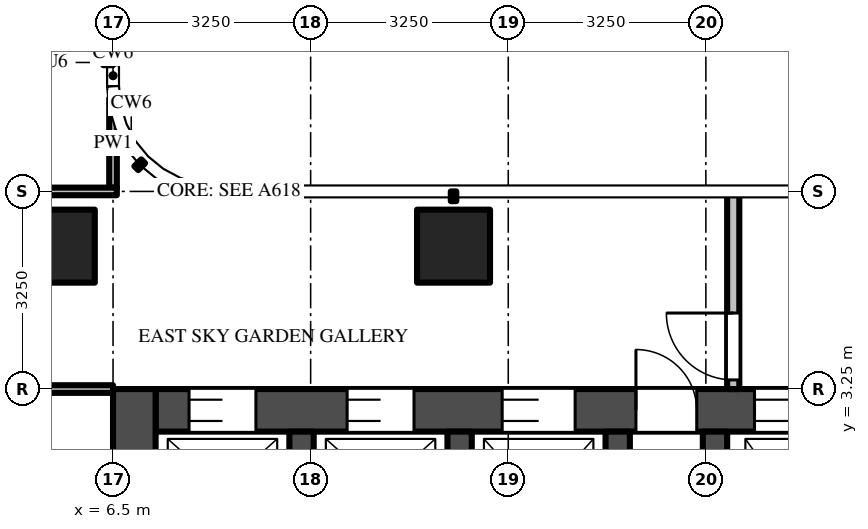
"""IFC4 building model, lengths in metres.
Left out: names, types, materials, properties, quantities, classifications, styles, units other than length and angle.
Written with IfcOpenShell. Run it as: python <this file> out.ifc"""

import sys

from ifc_helpers import new_model, si_unit, direction, frame, frame_2d, origin, origin_2d, place, context, subcontext, project, spatial, rectangle, extrude, source, transform, mapped, element, fill, save


model = new_model("IFC4")
c1 = context("Model", 3, precision=1e-05, world=origin(), true_north=direction((0.0, 1.0)))
c2 = subcontext(c1, "Body", "Model", "MODEL_VIEW")
j1 = project(units=[si_unit("LENGTHUNIT", "METRE"), si_unit("PLANEANGLEUNIT", "RADIAN")], contexts=[c1])
p1 = place(None, origin())
s1 = spatial("IfcSite", under=j1, at=p1, CompositionType="ELEMENT")
p2 = place(p1, origin())
s2 = spatial("IfcBuilding", under=s1, at=p2, CompositionType="ELEMENT")
p3 = place(p2, frame((0.0, 0.0, 156.0)))
s3 = spatial("IfcBuildingStorey", under=s2, at=p3, CompositionType="ELEMENT", Elevation=156.0)
m1 = source(origin(), c2, "Body", "SweptSolid", [
    extrude(rectangle(XDim=1.2, YDim=1.2, at=origin_2d()), origin(), (0.0, 0.0, 1.0), 6.0),
])
for number, where, z_axis, x_axis in (
    (1, (12.1, 5.6, 0.0), (0.0, 0.0, 1.0), (1.0, 0.0, 0.0)),
    (2, (5.6, 5.6, 0.0), (0.0, 0.0, 1.0), (1.0, 0.0, 0.0)),
):
    element("IfcColumn", number, at=place(p3, frame(where, z_axis=z_axis, x_axis=x_axis)), inside=s3, PredefinedType="COLUMN", context=c2, shape_type="MappedRepresentation", body=[
        mapped(m1, transform((0.0, 0.0, 0.0))),
    ])
m2 = source(origin(), c2, "Body", "SweptSolid", [
    extrude(rectangle(XDim=14.85, YDim=0.7, at=frame_2d((7.425, 0.0))), origin(), (0.0, 0.0, 1.0), 5.8),
])
p4 = place(p3, frame((7.2, 2.9, 0.0), z_axis=(0.0, 0.0, 1.0), x_axis=(1.0, 0.0, 0.0)))
e3 = element("IfcWall", 3, at=p4, inside=s3, PredefinedType="SHEAR", context=c2, shape_type="MappedRepresentation", body=[
    mapped(m2, transform((0.0, 0.0, 0.0))),
])
m3 = source(origin(), c2, "Body", "SweptSolid", [
    extrude(rectangle(XDim=1.1, YDim=2.1, at=frame_2d((0.55, 1.05))), frame((0.0, 0.36, 0.0), z_axis=(0.0, -1.0, 0.0), x_axis=(1.0, 0.0, 0.0)), (0.0, 0.0, 1.0), 0.72),
])
p5 = place(p4, frame((0.55, 0.0, 0.0)))
e4 = element("IfcOpeningElement", 4, at=p5, cuts=e3, PredefinedType="OPENING", context=c2, shape_type="MappedRepresentation", body=[
    mapped(m3, transform((0.0, 0.0, 0.0))),
])
p6 = place(p4, frame((3.15, 0.0, 0.0)))
e5 = element("IfcOpeningElement", 5, at=p6, cuts=e3, PredefinedType="OPENING", context=c2, shape_type="MappedRepresentation", body=[
    mapped(m3, transform((0.0, 0.0, 0.0))),
])
m4 = source(origin(), c2, "Body", "SweptSolid", [
    extrude(rectangle(XDim=1.2, YDim=2.1, at=frame_2d((0.6, 1.05))), frame((0.0, 0.36, 0.0), z_axis=(0.0, -1.0, 0.0), x_axis=(1.0, 0.0, 0.0)), (0.0, 0.0, 1.0), 0.72),
])
p7 = place(p4, frame((5.7, 0.0, 0.0)))
e6 = element("IfcOpeningElement", 6, at=p7, cuts=e3, PredefinedType="OPENING", context=c2, shape_type="MappedRepresentation", body=[
    mapped(m4, transform((0.0, 0.0, 0.0))),
])
m5 = source(origin(), c2, "Body", "SweptSolid", [
    extrude(rectangle(XDim=1.3, YDim=2.1, at=frame_2d((0.65, 1.05))), frame((0.0, 0.36, 0.0), z_axis=(0.0, -1.0, 0.0), x_axis=(1.0, 0.0, 0.0)), (0.0, 0.0, 1.0), 0.72),
])
p8 = place(p4, frame((12.2, 0.0, 0.0)))
e7 = element("IfcOpeningElement", 7, at=p8, cuts=e3, PredefinedType="OPENING", context=c2, shape_type="MappedRepresentation", body=[
    mapped(m5, transform((0.0, 0.0, 0.0))),
])
p9 = place(p4, frame((9.85, 0.0, 0.0)))
e8 = element("IfcOpeningElement", 8, at=p9, cuts=e3, PredefinedType="OPENING", context=c2, shape_type="MappedRepresentation", body=[
    mapped(m4, transform((0.0, 0.0, 0.0))),
])
m6 = source(origin(), c2, "Body", "SweptSolid", [
    extrude(rectangle(XDim=1.0, YDim=2.1, at=frame_2d((0.5, 1.05))), frame((0.0, 0.36, 0.0), z_axis=(0.0, -1.0, 0.0), x_axis=(1.0, 0.0, 0.0)), (0.0, 0.0, 1.0), 0.72),
])
p10 = place(p4, frame((7.9, 0.0, 0.0)))
e9 = element("IfcOpeningElement", 9, at=p10, cuts=e3, PredefinedType="OPENING", context=c2, shape_type="MappedRepresentation", body=[
    mapped(m6, transform((0.0, 0.0, 0.0))),
])
m7 = source(origin(), c2, "Body", "SweptSolid", [
    extrude(rectangle(XDim=9.05, YDim=0.7, at=frame_2d((4.525, 0.0))), origin(), (0.0, 0.0, 1.0), 5.8),
])
p11 = place(p3, frame((6.85, -5.8, 0.0), z_axis=(0.0, 0.0, 1.0), x_axis=(0.0, 1.0, 0.0)))
e10 = element("IfcWall", 10, at=p11, inside=s3, PredefinedType="SHEAR", context=c2, shape_type="MappedRepresentation", body=[
    mapped(m7, transform((0.0, 0.0, 0.0))),
])
m8 = source(origin(), c2, "Body", "SweptSolid", [
    extrude(rectangle(XDim=1.8, YDim=2.1, at=frame_2d((0.9, 1.05))), frame((0.0, 0.36, 0.0), z_axis=(0.0, -1.0, 0.0), x_axis=(1.0, 0.0, 0.0)), (0.0, 0.0, 1.0), 0.72),
])
p12 = place(p11, frame((3.15, 0.0, 0.0)))
e11 = element("IfcOpeningElement", 11, at=p12, cuts=e10, PredefinedType="OPENING", context=c2, shape_type="MappedRepresentation", body=[
    mapped(m8, transform((0.0, 0.0, 0.0))),
])
m9 = source(origin(), c2, "Body", "SweptSolid", [
    extrude(rectangle(XDim=2.45, YDim=0.4, at=frame_2d((1.225, 0.0))), origin(), (0.0, 0.0, 1.0), 5.8),
])
for number, where, z_axis, x_axis in (
    (12, (9.6, 0.1, 0.0), (0.0, 0.0, 1.0), (0.0, 1.0, 0.0)),
    (13, (12.2, 0.1, 0.0), (0.0, 0.0, 1.0), (0.0, 1.0, 0.0)),
    (14, (14.8, 0.1, 0.0), (0.0, 0.0, 1.0), (0.0, 1.0, 0.0)),
    (15, (16.4, 0.1, 0.0), (0.0, 0.0, 1.0), (0.0, 1.0, 0.0)),
):
    element("IfcWall", number, at=place(p3, frame(where, z_axis=z_axis, x_axis=x_axis)), inside=s3, PredefinedType="SHEAR", context=c2, shape_type="MappedRepresentation", body=[
        mapped(m9, transform((0.0, 0.0, 0.0))),
    ])
m10 = source(origin(), c2, "Body", "SweptSolid", [
    extrude(rectangle(XDim=3.25, YDim=0.2, at=frame_2d((1.625, 0.0))), origin(), (0.0, 0.0, 1.0), 5.8),
])
p13 = place(p3, frame((16.7, 3.25, 0.0), z_axis=(0.0, 0.0, 1.0), x_axis=(0.0, 1.0, 0.0)))
e16 = element("IfcWall", 16, at=p13, inside=s3, PredefinedType="PARTITIONING", context=c2, shape_type="MappedRepresentation", body=[
    mapped(m10, transform((0.0, 0.0, 0.0))),
])
m11 = source(origin(), c2, "Body", "SweptSolid", [
    extrude(rectangle(XDim=1.1, YDim=2.1, at=frame_2d((0.55, 1.05))), frame((0.0, 0.11, 0.0), z_axis=(0.0, -1.0, 0.0), x_axis=(1.0, 0.0, 0.0)), (0.0, 0.0, 1.0), 0.22),
])
p14 = place(p13, frame((0.15, 0.0, 0.0)))
e17 = element("IfcOpeningElement", 17, at=p14, cuts=e16, PredefinedType="OPENING", context=c2, shape_type="MappedRepresentation", body=[
    mapped(m11, transform((0.0, 0.0, 0.0))),
])
p15 = place(p3, frame((6.4, 8.666, 0.0), z_axis=(0.0, 0.0, 1.0), x_axis=(0.0, 1.0, 0.0)))
e18 = element("IfcWall", 18, at=p15, inside=s3, PredefinedType="SOLIDWALL", context=c2, shape_type="SweptSolid", body=[
    extrude(rectangle(XDim=3.0, YDim=0.2, at=frame_2d((1.5, 0.0))), origin(), (0.0, 0.0, 1.0), 5.8),
])
m12 = source(origin(), c2, "Body", "SweptSolid", [
    extrude(rectangle(XDim=1.8, YDim=2.4, at=frame_2d((0.9, 1.2))), frame((0.0, 0.11, 0.0), z_axis=(0.0, -1.0, 0.0), x_axis=(1.0, 0.0, 0.0)), (0.0, 0.0, 1.0), 0.22),
])
p16 = place(p15, frame((0.6, 0.0, 0.0)))
e19 = element("IfcOpeningElement", 19, at=p16, cuts=e18, PredefinedType="OPENING", context=c2, shape_type="MappedRepresentation", body=[
    mapped(m12, transform((0.0, 0.0, 0.0))),
])
m13 = source(origin(), c2, "Body", "SweptSolid", [
    extrude(rectangle(XDim=1.469, YDim=0.125, at=frame_2d((0.734, 0.0))), origin(), (0.0, 0.0, 1.0), 5.8),
])
p17 = place(p3, frame((6.5, 6.562, 0.0), z_axis=(0.0, 0.0, 1.0), x_axis=(0.0, 1.0, 0.0)))
e20 = element("IfcWall", 20, at=p17, inside=s3, PredefinedType="PARTITIONING", context=c2, shape_type="MappedRepresentation", body=[
    mapped(m13, transform((0.0, 0.0, 0.0))),
])
m14 = source(origin(), c2, "Body", "SweptSolid", [
    extrude(rectangle(XDim=5.363, YDim=0.125, at=frame_2d((2.681, 0.0))), origin(), (0.0, 0.0, 1.0), 5.097),
])
p18 = place(p3, frame((1.137, 3.25, 0.0), z_axis=(0.0, 0.0, 1.0), x_axis=(1.0, 0.0, 0.0)))
e21 = element("IfcWall", 21, at=p18, inside=s3, PredefinedType="PARTITIONING", context=c2, shape_type="MappedRepresentation", body=[
    mapped(m14, transform((0.0, 0.0, 0.0))),
])
p19 = place(p3, frame((-1.262, 6.5, 0.0), z_axis=(0.0, 0.0, 1.0), x_axis=(1.0, 0.0, 0.0)))
e22 = element("IfcWall", 22, at=p19, inside=s3, PredefinedType="PARTITIONING", context=c2, shape_type="SweptSolid", body=[
    extrude(rectangle(XDim=7.825, YDim=0.125, at=frame_2d((3.913, 0.0))), origin(), (0.0, 0.0, 1.0), 4.88),
])
m15 = source(origin(), c2, "Body", "SweptSolid", [
    extrude(rectangle(XDim=1.8, YDim=2.1, at=frame_2d((0.9, 1.05))), frame((0.0, 0.073, 0.0), z_axis=(0.0, -1.0, 0.0), x_axis=(1.0, 0.0, 0.0)), (0.0, 0.0, 1.0), 0.145),
])
p20 = place(p19, frame((4.413, 0.0, 0.0)))
e23 = element("IfcOpeningElement", 23, at=p20, cuts=e22, PredefinedType="OPENING", context=c2, shape_type="MappedRepresentation", body=[
    mapped(m15, transform((0.0, 0.0, 0.0))),
])
m16 = source(origin(), c2, "Body", "SweptSolid", [
    extrude(rectangle(XDim=1.1, YDim=2.1, at=frame_2d((0.55, 1.05))), frame((0.0, -0.275, 0.0), z_axis=(0.0, -1.0, 0.0), x_axis=(1.0, 0.0, 0.0)), (0.0, 0.0, 1.0), 0.05),
])
p21 = place(p5, origin())
e24 = element("IfcDoor", 24, at=p21, inside=s3, OperationType="DOUBLE_DOOR_SLIDING", PredefinedType="DOOR", context=c2, shape_type="MappedRepresentation", body=[
    mapped(m16, transform((0.0, 0.0, 0.0))),
])
fill(e4, e24)
p22 = place(p6, origin())
e25 = element("IfcDoor", 25, at=p22, inside=s3, OperationType="DOUBLE_DOOR_SLIDING", PredefinedType="DOOR", context=c2, shape_type="MappedRepresentation", body=[
    mapped(m16, transform((0.0, 0.0, 0.0))),
])
fill(e5, e25)
m17 = source(origin(), c2, "Body", "SweptSolid", [
    extrude(rectangle(XDim=1.2, YDim=2.1, at=frame_2d((0.6, 1.05))), frame((0.0, -0.275, 0.0), z_axis=(0.0, -1.0, 0.0), x_axis=(1.0, 0.0, 0.0)), (0.0, 0.0, 1.0), 0.05),
])
p23 = place(p7, origin())
e26 = element("IfcDoor", 26, at=p23, inside=s3, OperationType="DOUBLE_DOOR_SLIDING", PredefinedType="DOOR", context=c2, shape_type="MappedRepresentation", body=[
    mapped(m17, transform((0.0, 0.0, 0.0))),
])
fill(e6, e26)
p24 = place(p9, origin())
e27 = element("IfcDoor", 27, at=p24, inside=s3, OperationType="DOUBLE_DOOR_SLIDING", PredefinedType="DOOR", context=c2, shape_type="MappedRepresentation", body=[
    mapped(m17, transform((0.0, 0.0, 0.0))),
])
fill(e8, e27)
m18 = source(origin(), c2, "Body", "SweptSolid", [
    extrude(rectangle(XDim=1.0, YDim=2.1, at=frame_2d((0.5, 1.05))), frame((0.0, -0.275, 0.0), z_axis=(0.0, -1.0, 0.0), x_axis=(1.0, 0.0, 0.0)), (0.0, 0.0, 1.0), 0.05),
])
p25 = place(p10, origin())
e28 = element("IfcDoor", 28, at=p25, inside=s3, OperationType="SINGLE_SWING_LEFT", PredefinedType="DOOR", context=c2, shape_type="MappedRepresentation", body=[
    mapped(m18, transform((0.0, 0.0, 0.0))),
])
fill(e9, e28)
m19 = source(origin(), c2, "Body", "SweptSolid", [
    extrude(rectangle(XDim=1.1, YDim=2.1, at=frame_2d((0.55, 1.05))), frame((0.0, 0.025, 0.0), z_axis=(0.0, -1.0, 0.0), x_axis=(1.0, 0.0, 0.0)), (0.0, 0.0, 1.0), 0.05),
])
p26 = place(p14, origin())
e29 = element("IfcDoor", 29, at=p26, inside=s3, OperationType="SINGLE_SWING_RIGHT", PredefinedType="DOOR", context=c2, shape_type="MappedRepresentation", body=[
    mapped(m19, transform((0.0, 0.0, 0.0))),
])
fill(e17, e29)
save(model, sys.argv[1])
